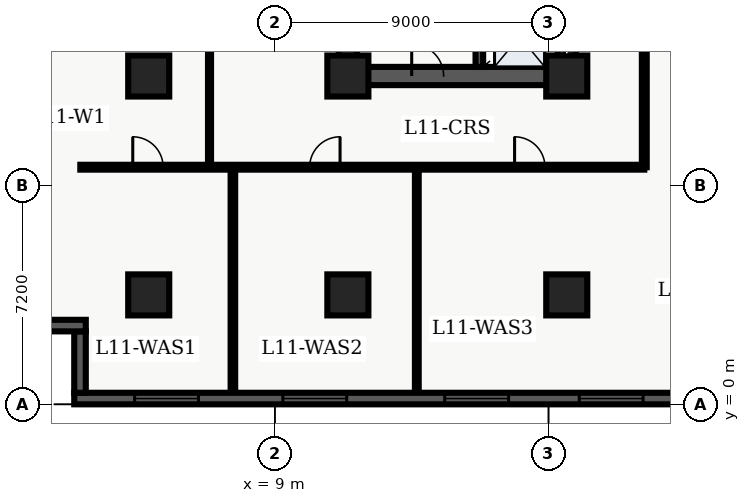
"""IFC4 building model, lengths in metres.
Left out: names, types, materials, properties, quantities, classifications, styles, units other than length and angle.
Written with IfcOpenShell. Run it as: python <this file> out.ifc"""

import sys

from ifc_helpers import new_model, entity, si_unit, converted_unit, direction, frame, origin_with_axes, origin_2d_with_axis, place, context, subcontext, project, spatial, polyline, rectangle, outline, extrude, element, fill, save


model = new_model("IFC4")
c1 = context("Model", 3, precision=1e-05, world=origin_with_axes(), true_north=direction((0.0, 1.0)))
c2 = subcontext(c1, "Body", "Model", "MODEL_VIEW")
j1 = project(units=[si_unit("LENGTHUNIT", "METRE"), converted_unit("PLANEANGLEUNIT", "DEGREE", entity("IfcPlaneAngleMeasure", 0.017), si_unit("PLANEANGLEUNIT", "RADIAN"), dimensions=[0, 0, 0, 0, 0, 0, 0])], contexts=[c1])
p1 = place(None, origin_with_axes())
s1 = spatial("IfcSite", under=j1, at=p1, CompositionType="ELEMENT")
p2 = place(p1, origin_with_axes())
s2 = spatial("IfcBuilding", under=s1, at=p2, CompositionType="ELEMENT")
p3 = place(p2, frame((0.0, 0.0, 48.3), z_axis=(0.0, 0.0, 1.0), x_axis=(1.0, 0.0, 0.0)))
s3 = spatial("IfcBuildingStorey", under=s2, at=p3, CompositionType="ELEMENT", Elevation=48.3)
p4 = place(p3, frame((11.4, 10.8, 0.0), z_axis=(0.0, 0.0, 1.0), x_axis=(0.0, 1.0, 0.0)))
e1 = element("IfcWall", 1, at=p4, inside=s3, PredefinedType="SHEAR", context=c2, shape_type="SweptSolid", body=[
    extrude(outline(polyline([(0.0, -0.3), (27.0, -0.3), (27.0, 0.3), (0.0, 0.3), (0.0, -0.3)])), origin_with_axes(), (0.0, 0.0, 1.0), 3.66),
])
p5 = place(p3, frame((11.4, 10.8, 0.0), z_axis=(0.0, 0.0, 1.0), x_axis=(1.0, 0.0, 0.0)))
e2 = element("IfcWall", 2, at=p5, inside=s3, PredefinedType="SHEAR", context=c2, shape_type="SweptSolid", body=[
    extrude(outline(polyline([(0.0, -0.3), (7.2, -0.3), (7.2, 0.3), (0.0, 0.3), (0.0, -0.3)])), origin_with_axes(), (0.0, 0.0, 1.0), 3.66),
])
p6 = place(p5, frame((2.625, 0.0, 0.0), z_axis=(0.0, 0.0, 1.0), x_axis=(1.0, 0.0, 0.0)))
e3 = element("IfcOpeningElement", 3, at=p6, cuts=e2, PredefinedType="OPENING", context=c2, shape_type="SweptSolid", body=[
    extrude(rectangle(XDim=1.05, YDim=0.62, at=origin_2d_with_axis()), origin_with_axes(), (0.0, 0.0, 1.0), 2.15),
])
p7 = place(p3, frame((18.6, 10.8, 0.0), z_axis=(0.0, 0.0, 1.0), x_axis=(0.0, 1.0, 0.0)))
e4 = element("IfcWall", 4, at=p7, inside=s3, PredefinedType="SHEAR", context=c2, shape_type="SweptSolid", body=[
    extrude(outline(polyline([(0.0, -0.3), (13.5, -0.3), (13.5, 0.3), (0.0, 0.3), (0.0, -0.3)])), origin_with_axes(), (0.0, 0.0, 1.0), 3.66),
])
p8 = place(p7, frame((1.3, 0.0, 0.0), z_axis=(0.0, 0.0, 1.0), x_axis=(1.0, 0.0, 0.0)))
e5 = element("IfcOpeningElement", 5, at=p8, cuts=e4, PredefinedType="OPENING", context=c2, shape_type="SweptSolid", body=[
    extrude(rectangle(XDim=1.1, YDim=0.62, at=origin_2d_with_axis()), origin_with_axes(), (0.0, 0.0, 1.0), 2.15),
])
p9 = place(p7, frame((3.4, 0.0, 0.0), z_axis=(0.0, 0.0, 1.0), x_axis=(1.0, 0.0, 0.0)))
e6 = element("IfcOpeningElement", 6, at=p9, cuts=e4, PredefinedType="OPENING", context=c2, shape_type="SweptSolid", body=[
    extrude(rectangle(XDim=1.1, YDim=0.62, at=origin_2d_with_axis()), origin_with_axes(), (0.0, 0.0, 1.0), 2.15),
])
p10 = place(p7, frame((11.125, 0.0, 0.0), z_axis=(0.0, 0.0, 1.0), x_axis=(1.0, 0.0, 0.0)))
e7 = element("IfcOpeningElement", 7, at=p10, cuts=e4, PredefinedType="OPENING", context=c2, shape_type="SweptSolid", body=[
    extrude(rectangle(XDim=1.05, YDim=0.62, at=origin_2d_with_axis()), origin_with_axes(), (0.0, 0.0, 1.0), 2.15),
])
p11 = place(p3, frame((15.725, 11.1, 0.0), z_axis=(0.0, 0.0, 1.0), x_axis=(0.0, 1.0, 0.0)))
e8 = element("IfcWall", 8, at=p11, inside=s3, PredefinedType="SHEAR", context=c2, shape_type="SweptSolid", body=[
    extrude(outline(polyline([(0.0, -0.125), (8.6, -0.125), (8.6, 0.125), (0.0, 0.125), (0.0, -0.125)])), origin_with_axes(), (0.0, 0.0, 1.0), 3.66),
])
for number, where, z_axis, x_axis in (
    (9, (11.4, 3.6, 0.0), (0.0, 0.0, 1.0), (1.0, 0.0, 0.0)),
    (10, (11.4, 10.8, 0.0), (0.0, 0.0, 1.0), (1.0, 0.0, 0.0)),
    (11, (18.6, 3.6, 0.0), (0.0, 0.0, 1.0), (1.0, 0.0, 0.0)),
    (12, (18.6, 10.8, 0.0), (0.0, 0.0, 1.0), (1.0, 0.0, 0.0)),
    (13, (4.85, 3.6, 0.0), (0.0, 0.0, 1.0), (1.0, 0.0, 0.0)),
    (14, (4.85, 10.8, 0.0), (0.0, 0.0, 1.0), (1.0, 0.0, 0.0)),
):
    element("IfcColumn", number, at=place(p3, frame(where, z_axis=z_axis, x_axis=x_axis)), inside=s3, PredefinedType="COLUMN", context=c2, shape_type="SweptSolid", body=[
        extrude(rectangle(XDim=1.35, YDim=1.35, at=origin_2d_with_axis()), origin_with_axes(), (0.0, 0.0, 1.0), 3.9),
    ])
p12 = place(p3, frame((2.6, 7.8, 0.0), z_axis=(0.0, 0.0, 1.0), x_axis=(1.0, 0.0, 0.0)))
e15 = element("IfcWall", 15, at=p12, inside=s3, PredefinedType="PARTITIONING", context=c2, shape_type="SweptSolid", body=[
    extrude(outline(polyline([(0.0, -0.08), (18.55, -0.08), (18.55, 0.08), (0.0, 0.08), (0.0, -0.08)])), origin_with_axes(), (0.0, 0.0, 1.0), 2.7),
])
p13 = place(p12, frame((2.225, 0.0, 0.0), z_axis=(0.0, 0.0, 1.0), x_axis=(1.0, 0.0, 0.0)))
e16 = element("IfcOpeningElement", 16, at=p13, cuts=e15, PredefinedType="OPENING", context=c2, shape_type="SweptSolid", body=[
    extrude(rectangle(XDim=1.0, YDim=0.18, at=origin_2d_with_axis()), origin_with_axes(), (0.0, 0.0, 1.0), 2.15),
])
p14 = place(p12, frame((8.043, 0.0, 0.0), z_axis=(0.0, 0.0, 1.0), x_axis=(1.0, 0.0, 0.0)))
e17 = element("IfcOpeningElement", 17, at=p14, cuts=e15, PredefinedType="OPENING", context=c2, shape_type="SweptSolid", body=[
    extrude(rectangle(XDim=1.0, YDim=0.18, at=origin_2d_with_axis()), origin_with_axes(), (0.0, 0.0, 1.0), 2.15),
])
p15 = place(p12, frame((14.784, 0.0, 0.0), z_axis=(0.0, 0.0, 1.0), x_axis=(1.0, 0.0, 0.0)))
e18 = element("IfcOpeningElement", 18, at=p15, cuts=e15, PredefinedType="OPENING", context=c2, shape_type="SweptSolid", body=[
    extrude(rectangle(XDim=1.0, YDim=0.18, at=origin_2d_with_axis()), origin_with_axes(), (0.0, 0.0, 1.0), 2.15),
])
p16 = place(p3, frame((21.15, 7.8, 0.0), z_axis=(0.0, 0.0, 1.0), x_axis=(0.0, 1.0, 0.0)))
e19 = element("IfcWall", 19, at=p16, inside=s3, PredefinedType="PARTITIONING", context=c2, shape_type="SweptSolid", body=[
    extrude(outline(polyline([(0.0, -0.08), (32.7, -0.08), (32.7, 0.08), (0.0, 0.08), (0.0, -0.08)])), origin_with_axes(), (0.0, 0.0, 1.0), 2.7),
])
p17 = place(p16, frame((5.475, 0.0, 0.0), z_axis=(0.0, 0.0, 1.0), x_axis=(1.0, 0.0, 0.0)))
e20 = element("IfcOpeningElement", 20, at=p17, cuts=e19, PredefinedType="OPENING", context=c2, shape_type="SweptSolid", body=[
    extrude(rectangle(XDim=1.05, YDim=0.18, at=origin_2d_with_axis()), origin_with_axes(), (0.0, 0.0, 1.0), 2.15),
])
p18 = place(p3, frame((6.85, 7.8, 0.0), z_axis=(0.0, 0.0, 1.0), x_axis=(0.0, 1.0, 0.0)))
e21 = element("IfcWall", 21, at=p18, inside=s3, PredefinedType="PARTITIONING", context=c2, shape_type="SweptSolid", body=[
    extrude(outline(polyline([(0.0, -0.05), (32.7, -0.05), (32.7, 0.05), (0.0, 0.05), (0.0, -0.05)])), origin_with_axes(), (0.0, 0.0, 1.0), 2.7),
])
p19 = place(p18, frame((4.357, 0.0, 0.0), z_axis=(0.0, 0.0, 1.0), x_axis=(1.0, 0.0, 0.0)))
e22 = element("IfcOpeningElement", 22, at=p19, cuts=e21, PredefinedType="OPENING", context=c2, shape_type="SweptSolid", body=[
    extrude(rectangle(XDim=1.0, YDim=0.12, at=origin_2d_with_axis()), origin_with_axes(), (0.0, 0.0, 1.0), 2.15),
])
p20 = place(p18, frame((11.996, 0.0, 0.0), z_axis=(0.0, 0.0, 1.0), x_axis=(1.0, 0.0, 0.0)))
e23 = element("IfcOpeningElement", 23, at=p20, cuts=e21, PredefinedType="OPENING", context=c2, shape_type="SweptSolid", body=[
    extrude(rectangle(XDim=1.0, YDim=0.12, at=origin_2d_with_axis()), origin_with_axes(), (0.0, 0.0, 1.0), 2.15),
])
p21 = place(p18, frame((22.0, 0.0, 0.0), z_axis=(0.0, 0.0, 1.0), x_axis=(1.0, 0.0, 0.0)))
e24 = element("IfcOpeningElement", 24, at=p21, cuts=e21, PredefinedType="OPENING", context=c2, shape_type="SweptSolid", body=[
    extrude(rectangle(XDim=1.0, YDim=0.12, at=origin_2d_with_axis()), origin_with_axes(), (0.0, 0.0, 1.0), 2.15),
])
p22 = place(p18, frame((31.67, 0.0, 0.0), z_axis=(0.0, 0.0, 1.0), x_axis=(1.0, 0.0, 0.0)))
e25 = element("IfcOpeningElement", 25, at=p22, cuts=e21, PredefinedType="OPENING", context=c2, shape_type="SweptSolid", body=[
    extrude(rectangle(XDim=1.0, YDim=0.12, at=origin_2d_with_axis()), origin_with_axes(), (0.0, 0.0, 1.0), 2.15),
])
p23 = place(p3, frame((7.619, 0.36, 0.0), z_axis=(0.0, 0.0, 1.0), x_axis=(0.0, 1.0, 0.0)))
e26 = element("IfcWall", 26, at=p23, inside=s3, PredefinedType="PARTITIONING", context=c2, shape_type="SweptSolid", body=[
    extrude(outline(polyline([(0.0, -0.075), (7.34, -0.075), (7.34, 0.075), (0.0, 0.075), (0.0, -0.075)])), origin_with_axes(), (0.0, 0.0, 1.0), 2.7),
])
p24 = place(p3, frame((13.668, 0.36, 0.0), z_axis=(0.0, 0.0, 1.0), x_axis=(0.0, 1.0, 0.0)))
e27 = element("IfcWall", 27, at=p24, inside=s3, PredefinedType="PARTITIONING", context=c2, shape_type="SweptSolid", body=[
    extrude(outline(polyline([(0.0, -0.062), (7.34, -0.062), (7.34, 0.062), (0.0, 0.062), (0.0, -0.062)])), origin_with_axes(), (0.0, 0.0, 1.0), 2.7),
])
p25 = place(p3, frame((57.22, 0.19, 0.0), z_axis=(0.0, 0.0, 1.0), x_axis=(-1.0, 0.0, 0.0)))
e28 = element("IfcWall", 28, at=p25, inside=s3, PredefinedType="SOLIDWALL", context=c2, shape_type="SweptSolid", body=[
    extrude(outline(polyline([(0.0, -0.19), (54.82, -0.19), (54.82, 0.19), (0.0, 0.19), (0.0, -0.19)])), origin_with_axes(), (0.0, 0.0, 1.0), 3.66),
])
p26 = place(p25, frame((3.037, 0.0, 0.45), z_axis=(0.0, 0.0, 1.0), x_axis=(1.0, 0.0, 0.0)))
e29 = element("IfcOpeningElement", 29, at=p26, cuts=e28, PredefinedType="OPENING", context=c2, shape_type="SweptSolid", body=[
    extrude(rectangle(XDim=2.1, YDim=0.4, at=origin_2d_with_axis()), origin_with_axes(), (0.0, 0.0, 1.0), 2.2),
])
p27 = place(p25, frame((7.912, 0.0, 0.45), z_axis=(0.0, 0.0, 1.0), x_axis=(1.0, 0.0, 0.0)))
e30 = element("IfcOpeningElement", 30, at=p27, cuts=e28, PredefinedType="OPENING", context=c2, shape_type="SweptSolid", body=[
    extrude(rectangle(XDim=2.1, YDim=0.4, at=origin_2d_with_axis()), origin_with_axes(), (0.0, 0.0, 1.0), 2.2),
])
p28 = place(p25, frame((12.786, 0.0, 0.45), z_axis=(0.0, 0.0, 1.0), x_axis=(1.0, 0.0, 0.0)))
e31 = element("IfcOpeningElement", 31, at=p28, cuts=e28, PredefinedType="OPENING", context=c2, shape_type="SweptSolid", body=[
    extrude(rectangle(XDim=2.1, YDim=0.4, at=origin_2d_with_axis()), origin_with_axes(), (0.0, 0.0, 1.0), 2.2),
])
p29 = place(p25, frame((17.661, 0.0, 0.45), z_axis=(0.0, 0.0, 1.0), x_axis=(1.0, 0.0, 0.0)))
e32 = element("IfcOpeningElement", 32, at=p29, cuts=e28, PredefinedType="OPENING", context=c2, shape_type="SweptSolid", body=[
    extrude(rectangle(XDim=2.1, YDim=0.4, at=origin_2d_with_axis()), origin_with_axes(), (0.0, 0.0, 1.0), 2.2),
])
p30 = place(p25, frame((22.535, 0.0, 0.45), z_axis=(0.0, 0.0, 1.0), x_axis=(1.0, 0.0, 0.0)))
e33 = element("IfcOpeningElement", 33, at=p30, cuts=e28, PredefinedType="OPENING", context=c2, shape_type="SweptSolid", body=[
    extrude(rectangle(XDim=2.1, YDim=0.4, at=origin_2d_with_axis()), origin_with_axes(), (0.0, 0.0, 1.0), 2.2),
])
p31 = place(p25, frame((27.41, 0.0, 0.45), z_axis=(0.0, 0.0, 1.0), x_axis=(1.0, 0.0, 0.0)))
e34 = element("IfcOpeningElement", 34, at=p31, cuts=e28, PredefinedType="OPENING", context=c2, shape_type="SweptSolid", body=[
    extrude(rectangle(XDim=2.1, YDim=0.4, at=origin_2d_with_axis()), origin_with_axes(), (0.0, 0.0, 1.0), 2.2),
])
p32 = place(p25, frame((32.285, 0.0, 0.45), z_axis=(0.0, 0.0, 1.0), x_axis=(1.0, 0.0, 0.0)))
e35 = element("IfcOpeningElement", 35, at=p32, cuts=e28, PredefinedType="OPENING", context=c2, shape_type="SweptSolid", body=[
    extrude(rectangle(XDim=2.1, YDim=0.4, at=origin_2d_with_axis()), origin_with_axes(), (0.0, 0.0, 1.0), 2.2),
])
p33 = place(p25, frame((37.159, 0.0, 0.45), z_axis=(0.0, 0.0, 1.0), x_axis=(1.0, 0.0, 0.0)))
e36 = element("IfcOpeningElement", 36, at=p33, cuts=e28, PredefinedType="OPENING", context=c2, shape_type="SweptSolid", body=[
    extrude(rectangle(XDim=2.1, YDim=0.4, at=origin_2d_with_axis()), origin_with_axes(), (0.0, 0.0, 1.0), 2.2),
])
p34 = place(p25, frame((41.584, 0.0, 0.45), z_axis=(0.0, 0.0, 1.0), x_axis=(1.0, 0.0, 0.0)))
e37 = element("IfcOpeningElement", 37, at=p34, cuts=e28, PredefinedType="OPENING", context=c2, shape_type="SweptSolid", body=[
    extrude(rectangle(XDim=2.1, YDim=0.4, at=origin_2d_with_axis()), origin_with_axes(), (0.0, 0.0, 1.0), 2.2),
])
p35 = place(p25, frame((46.908, 0.0, 0.45), z_axis=(0.0, 0.0, 1.0), x_axis=(1.0, 0.0, 0.0)))
e38 = element("IfcOpeningElement", 38, at=p35, cuts=e28, PredefinedType="OPENING", context=c2, shape_type="SweptSolid", body=[
    extrude(rectangle(XDim=2.1, YDim=0.4, at=origin_2d_with_axis()), origin_with_axes(), (0.0, 0.0, 1.0), 2.2),
])
p36 = place(p25, frame((51.783, 0.0, 0.45), z_axis=(0.0, 0.0, 1.0), x_axis=(1.0, 0.0, 0.0)))
e39 = element("IfcOpeningElement", 39, at=p36, cuts=e28, PredefinedType="OPENING", context=c2, shape_type="SweptSolid", body=[
    extrude(rectangle(XDim=2.1, YDim=0.4, at=origin_2d_with_axis()), origin_with_axes(), (0.0, 0.0, 1.0), 2.2),
])
p37 = place(p3, frame((2.59, 0.38, 0.0), z_axis=(0.0, 0.0, 1.0), x_axis=(0.0, 1.0, 0.0)))
e40 = element("IfcWall", 40, at=p37, inside=s3, PredefinedType="SOLIDWALL", context=c2, shape_type="SweptSolid", body=[
    extrude(outline(polyline([(0.0, -0.19), (2.02, -0.19), (2.02, 0.19), (0.0, 0.19), (0.0, -0.19)])), origin_with_axes(), (0.0, 0.0, 1.0), 3.66),
])
p38 = place(p3, frame((2.78, 2.59, 0.0), z_axis=(0.0, 0.0, 1.0), x_axis=(-1.0, 0.0, 0.0)))
e41 = element("IfcWall", 41, at=p38, inside=s3, PredefinedType="SOLIDWALL", context=c2, shape_type="SweptSolid", body=[
    extrude(outline(polyline([(0.0, -0.19), (2.78, -0.19), (2.78, 0.19), (0.0, 0.19), (0.0, -0.19)])), origin_with_axes(), (0.0, 0.0, 1.0), 3.66),
])
p39 = place(p7, frame((1.3, 0.0, 0.0), z_axis=(0.0, 0.0, 1.0), x_axis=(1.0, 0.0, 0.0)))
e42 = element("IfcDoor", 42, at=p39, inside=s3, OperationType="SLIDING_TO_LEFT", PredefinedType="DOOR", context=c2, shape_type="SweptSolid", body=[
    extrude(rectangle(XDim=1.1, YDim=0.09, at=origin_2d_with_axis()), origin_with_axes(), (0.0, 0.0, 1.0), 2.15),
])
fill(e5, e42)
p40 = place(p5, frame((2.625, 0.0, 0.0), z_axis=(0.0, 0.0, 1.0), x_axis=(1.0, 0.0, 0.0)))
e43 = element("IfcDoor", 43, at=p40, inside=s3, OperationType="SINGLE_SWING_LEFT", PredefinedType="DOOR", context=c2, shape_type="SweptSolid", body=[
    extrude(rectangle(XDim=1.05, YDim=0.09, at=origin_2d_with_axis()), origin_with_axes(), (0.0, 0.0, 1.0), 2.15),
])
fill(e3, e43)
p41 = place(p12, frame((2.225, 0.0, 0.0), z_axis=(0.0, 0.0, 1.0), x_axis=(1.0, 0.0, 0.0)))
e44 = element("IfcDoor", 44, at=p41, inside=s3, OperationType="SINGLE_SWING_LEFT", PredefinedType="DOOR", context=c2, shape_type="SweptSolid", body=[
    extrude(rectangle(XDim=1.0, YDim=0.09, at=origin_2d_with_axis()), origin_with_axes(), (0.0, 0.0, 1.0), 2.15),
])
fill(e16, e44)
p42 = place(p12, frame((8.043, 0.0, 0.0), z_axis=(0.0, 0.0, 1.0), x_axis=(1.0, 0.0, 0.0)))
e45 = element("IfcDoor", 45, at=p42, inside=s3, OperationType="SINGLE_SWING_RIGHT", PredefinedType="DOOR", context=c2, shape_type="SweptSolid", body=[
    extrude(rectangle(XDim=1.0, YDim=0.09, at=origin_2d_with_axis()), origin_with_axes(), (0.0, 0.0, 1.0), 2.15),
])
fill(e17, e45)
p43 = place(p12, frame((14.784, 0.0, 0.0), z_axis=(0.0, 0.0, 1.0), x_axis=(1.0, 0.0, 0.0)))
e46 = element("IfcDoor", 46, at=p43, inside=s3, OperationType="SINGLE_SWING_LEFT", PredefinedType="DOOR", context=c2, shape_type="SweptSolid", body=[
    extrude(rectangle(XDim=1.0, YDim=0.09, at=origin_2d_with_axis()), origin_with_axes(), (0.0, 0.0, 1.0), 2.15),
])
fill(e18, e46)
p44 = place(p25, frame((37.159, 0.0, 0.45), z_axis=(0.0, 0.0, 1.0), x_axis=(1.0, 0.0, 0.0)))
e47 = element("IfcWindow", 47, at=p44, inside=s3, PredefinedType="WINDOW", context=c2, shape_type="SweptSolid", body=[
    extrude(rectangle(XDim=2.1, YDim=0.09, at=origin_2d_with_axis()), origin_with_axes(), (0.0, 0.0, 1.0), 2.2),
])
fill(e36, e47)
p45 = place(p25, frame((41.584, 0.0, 0.45), z_axis=(0.0, 0.0, 1.0), x_axis=(1.0, 0.0, 0.0)))
e48 = element("IfcWindow", 48, at=p45, inside=s3, PredefinedType="WINDOW", context=c2, shape_type="SweptSolid", body=[
    extrude(rectangle(XDim=2.1, YDim=0.09, at=origin_2d_with_axis()), origin_with_axes(), (0.0, 0.0, 1.0), 2.2),
])
fill(e37, e48)
p46 = place(p25, frame((46.908, 0.0, 0.45), z_axis=(0.0, 0.0, 1.0), x_axis=(1.0, 0.0, 0.0)))
e49 = element("IfcWindow", 49, at=p46, inside=s3, PredefinedType="WINDOW", context=c2, shape_type="SweptSolid", body=[
    extrude(rectangle(XDim=2.1, YDim=0.09, at=origin_2d_with_axis()), origin_with_axes(), (0.0, 0.0, 1.0), 2.2),
])
fill(e38, e49)
p47 = place(p25, frame((51.783, 0.0, 0.45), z_axis=(0.0, 0.0, 1.0), x_axis=(1.0, 0.0, 0.0)))
e50 = element("IfcWindow", 50, at=p47, inside=s3, PredefinedType="WINDOW", context=c2, shape_type="SweptSolid", body=[
    extrude(rectangle(XDim=2.1, YDim=0.09, at=origin_2d_with_axis()), origin_with_axes(), (0.0, 0.0, 1.0), 2.2),
])
fill(e39, e50)
save(model, sys.argv[1])
